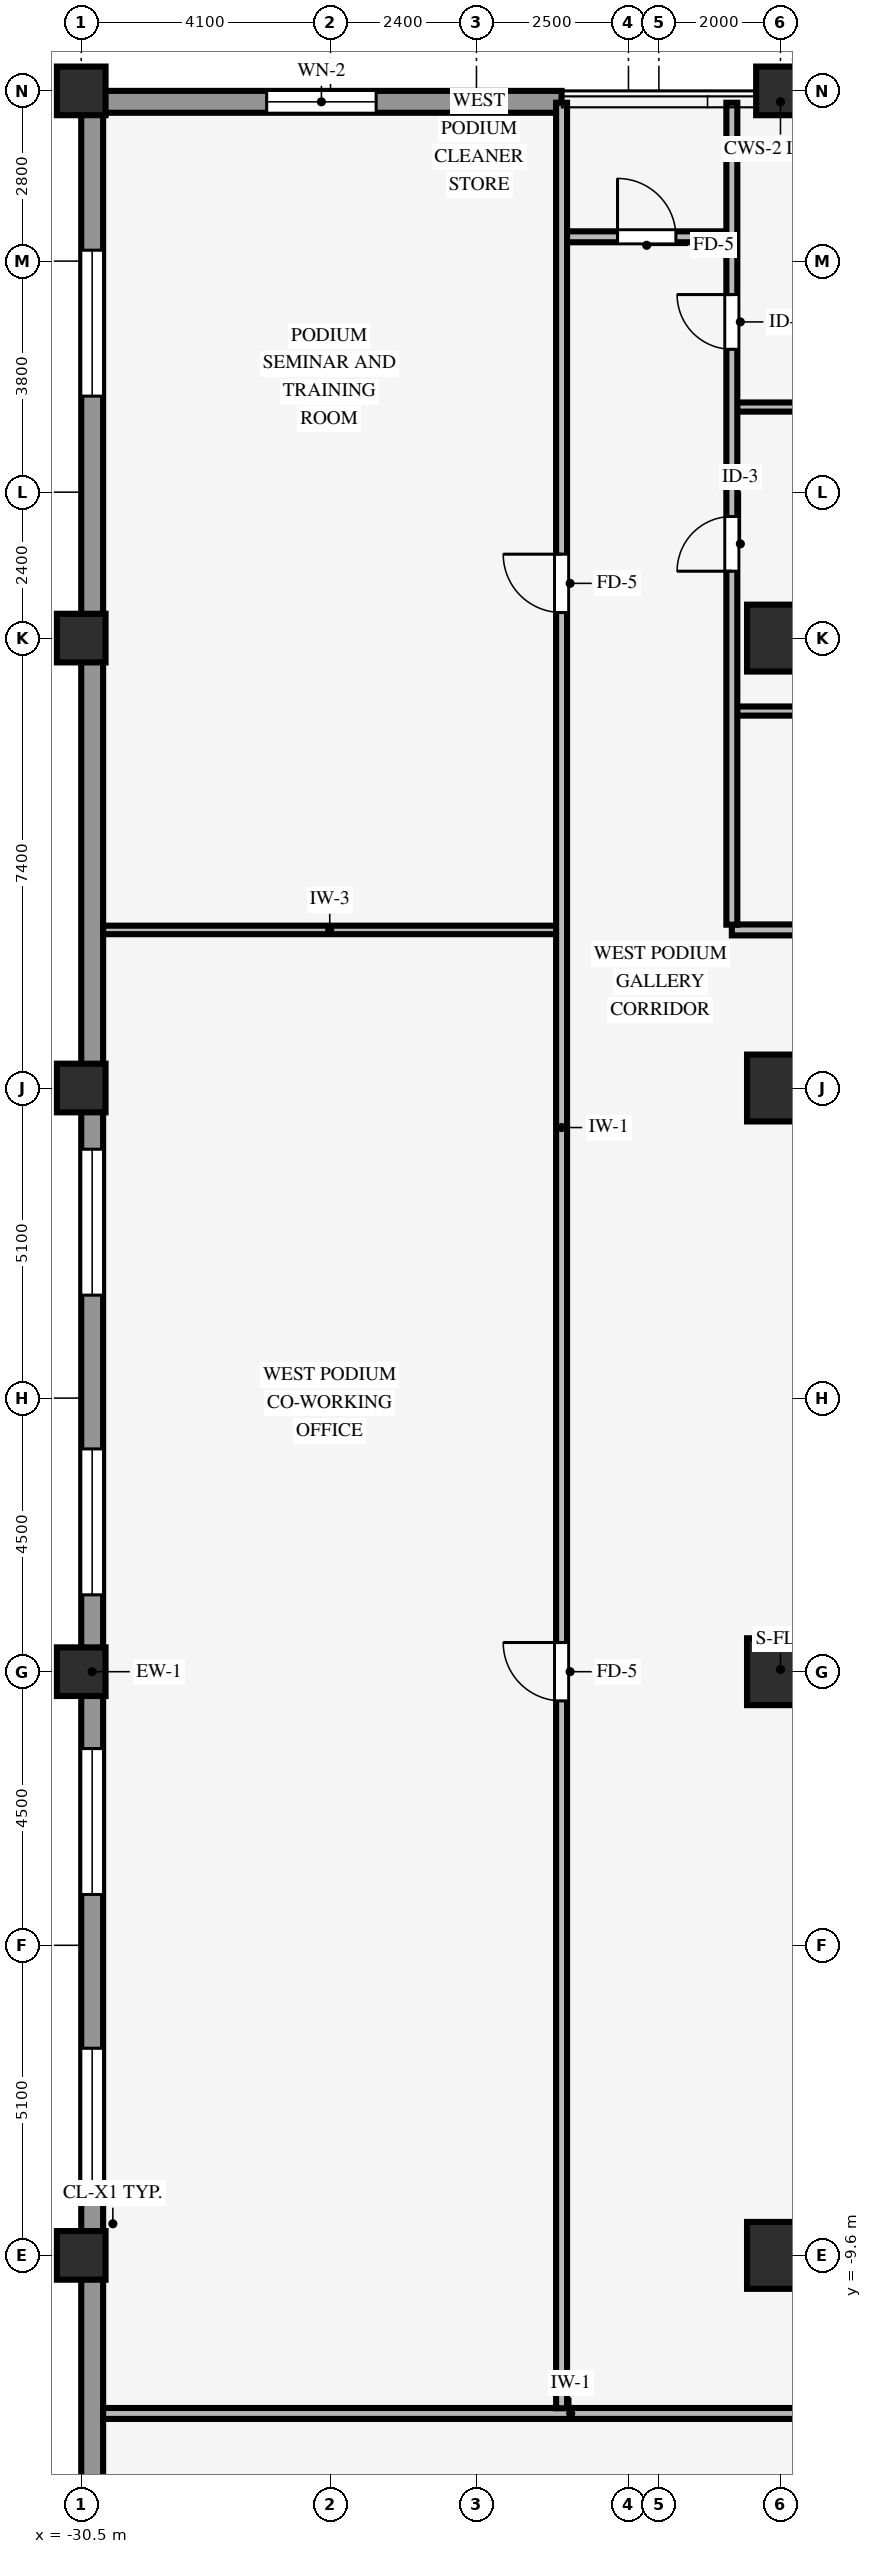
"""IFC4 building model, lengths in metres.
Left out: names, types, materials, properties, quantities, classifications, styles, units other than length and angle.
Written with IfcOpenShell. Run it as: python <this file> out.ifc"""

import sys

from ifc_helpers import new_model, si_unit, direction, frame, frame_2d, origin, origin_2d, place, context, subcontext, project, spatial, rectangle, hollow_rectangle, extrude, source, transform, mapped, element, fill, save


model = new_model("IFC4")
c1 = context("Model", 3, precision=1e-05, world=origin(), true_north=direction((0.0, 1.0)))
c2 = subcontext(c1, "Body", "Model", "MODEL_VIEW")
j1 = project(units=[si_unit("LENGTHUNIT", "METRE"), si_unit("PLANEANGLEUNIT", "RADIAN")], contexts=[c1])
p1 = place(None, origin())
s1 = spatial("IfcSite", under=j1, at=p1, CompositionType="ELEMENT")
p2 = place(p1, origin())
s2 = spatial("IfcBuilding", under=s1, at=p2, CompositionType="ELEMENT")
p3 = place(p2, frame((0.0, 0.0, 4.6)))
s3 = spatial("IfcBuildingStorey", under=s2, at=p3, CompositionType="ELEMENT", Elevation=4.6)
for number, where, z_axis, x_axis in (
    (1, (-30.5, -9.6, 0.0), (0.0, 0.0, 1.0), (1.0, 0.0, 0.0)),
    (2, (-30.5, 0.0, 0.0), (0.0, 0.0, 1.0), (1.0, 0.0, 0.0)),
    (3, (-30.5, 9.6, 0.0), (0.0, 0.0, 1.0), (1.0, 0.0, 0.0)),
    (4, (-30.5, 17.0, 0.0), (0.0, 0.0, 1.0), (1.0, 0.0, 0.0)),
    (5, (-30.5, 26.0, 0.0), (0.0, 0.0, 1.0), (1.0, 0.0, 0.0)),
):
    element("IfcColumn", number, at=place(p3, frame(where, z_axis=z_axis, x_axis=x_axis)), inside=s3, PredefinedType="COLUMN", context=c2, shape_type="SweptSolid", body=[
        extrude(hollow_rectangle(XDim=0.8, YDim=0.8, WallThickness=0.055, InnerFilletRadius=0.055, OuterFilletRadius=0.11, at=origin_2d()), origin(), (0.0, 0.0, 1.0), 4.28),
    ])
for number, where, z_axis, x_axis in (
    (6, (-19.0, -9.6, 0.0), (0.0, 0.0, 1.0), (1.0, 0.0, 0.0)),
    (7, (-19.0, 0.0, 0.0), (0.0, 0.0, 1.0), (1.0, 0.0, 0.0)),
    (8, (-19.0, 9.6, 0.0), (0.0, 0.0, 1.0), (1.0, 0.0, 0.0)),
    (9, (-19.0, 17.0, 0.0), (0.0, 0.0, 1.0), (1.0, 0.0, 0.0)),
):
    element("IfcColumn", number, at=place(p3, frame(where, z_axis=z_axis, x_axis=x_axis)), inside=s3, PredefinedType="COLUMN", context=c2, shape_type="SweptSolid", body=[
        extrude(rectangle(XDim=1.1, YDim=1.1, at=origin_2d()), origin(), (0.0, 0.0, 1.0), 4.28),
    ])
p4 = place(p3, frame((-19.0, 26.0, 0.0), z_axis=(0.0, 0.0, 1.0), x_axis=(1.0, 0.0, 0.0)))
e10 = element("IfcColumn", 10, at=p4, inside=s3, PredefinedType="COLUMN", context=c2, shape_type="SweptSolid", body=[
    extrude(hollow_rectangle(XDim=0.8, YDim=0.8, WallThickness=0.055, InnerFilletRadius=0.055, OuterFilletRadius=0.11, at=origin_2d()), origin(), (0.0, 0.0, 1.0), 4.28),
])
p5 = place(p3, frame((-30.5, 25.82, 0.0), z_axis=(0.0, 0.0, 1.0), x_axis=(1.0, 0.0, 0.0)))
e11 = element("IfcWall", 11, at=p5, inside=s3, PredefinedType="STANDARD", context=c2, shape_type="SweptSolid", body=[
    extrude(rectangle(XDim=7.9, YDim=0.36, at=frame_2d((3.95, 0.0))), origin(), (0.0, 0.0, 1.0), 3.615),
])
p6 = place(p5, frame((3.05, 0.0, 0.85)))
e12 = element("IfcOpeningElement", 12, at=p6, cuts=e11, PredefinedType="OPENING", context=c2, shape_type="SweptSolid", body=[
    extrude(rectangle(XDim=1.8, YDim=2.35, at=frame_2d((0.9, 1.175))), frame((0.0, 0.19, 0.0), z_axis=(0.0, -1.0, 0.0), x_axis=(1.0, 0.0, 0.0)), (0.0, 0.0, 1.0), 0.38),
])
p7 = place(p3, frame((-30.32, -25.644, 0.0), z_axis=(0.0, 0.0, 1.0), x_axis=(0.0, 1.0, 0.0)))
e13 = element("IfcWall", 13, at=p7, inside=s3, PredefinedType="STANDARD", context=c2, shape_type="SweptSolid", body=[
    extrude(rectangle(XDim=51.288, YDim=0.36, at=frame_2d((25.644, 0.0))), origin(), (0.0, 0.0, 1.0), 3.615),
])
p8 = place(p7, frame((2.264, 0.0, 0.85)))
e14 = element("IfcOpeningElement", 14, at=p8, cuts=e13, PredefinedType="OPENING", context=c2, shape_type="SweptSolid", body=[
    extrude(rectangle(XDim=2.4, YDim=2.45, at=frame_2d((1.2, 1.225))), frame((0.0, 0.19, 0.0), z_axis=(0.0, -1.0, 0.0), x_axis=(1.0, 0.0, 0.0)), (0.0, 0.0, 1.0), 0.38),
])
p9 = place(p7, frame((17.051, 0.0, 0.85)))
e15 = element("IfcOpeningElement", 15, at=p9, cuts=e13, PredefinedType="OPENING", context=c2, shape_type="SweptSolid", body=[
    extrude(rectangle(XDim=2.4, YDim=2.45, at=frame_2d((1.2, 1.225))), frame((0.0, 0.19, 0.0), z_axis=(0.0, -1.0, 0.0), x_axis=(1.0, 0.0, 0.0)), (0.0, 0.0, 1.0), 0.38),
])
p10 = place(p7, frame((21.979, 0.0, 0.85)))
e16 = element("IfcOpeningElement", 16, at=p10, cuts=e13, PredefinedType="OPENING", context=c2, shape_type="SweptSolid", body=[
    extrude(rectangle(XDim=2.4, YDim=2.45, at=frame_2d((1.2, 1.225))), frame((0.0, 0.19, 0.0), z_axis=(0.0, -1.0, 0.0), x_axis=(1.0, 0.0, 0.0)), (0.0, 0.0, 1.0), 0.38),
])
p11 = place(p7, frame((26.908, 0.0, 0.85)))
e17 = element("IfcOpeningElement", 17, at=p11, cuts=e13, PredefinedType="OPENING", context=c2, shape_type="SweptSolid", body=[
    extrude(rectangle(XDim=2.4, YDim=2.45, at=frame_2d((1.2, 1.225))), frame((0.0, 0.19, 0.0), z_axis=(0.0, -1.0, 0.0), x_axis=(1.0, 0.0, 0.0)), (0.0, 0.0, 1.0), 0.38),
])
p12 = place(p7, frame((31.837, 0.0, 0.85)))
e18 = element("IfcOpeningElement", 18, at=p12, cuts=e13, PredefinedType="OPENING", context=c2, shape_type="SweptSolid", body=[
    extrude(rectangle(XDim=2.4, YDim=2.45, at=frame_2d((1.2, 1.225))), frame((0.0, 0.19, 0.0), z_axis=(0.0, -1.0, 0.0), x_axis=(1.0, 0.0, 0.0)), (0.0, 0.0, 1.0), 0.38),
])
p13 = place(p7, frame((46.624, 0.0, 0.85)))
e19 = element("IfcOpeningElement", 19, at=p13, cuts=e13, PredefinedType="OPENING", context=c2, shape_type="SweptSolid", body=[
    extrude(rectangle(XDim=2.4, YDim=2.45, at=frame_2d((1.2, 1.225))), frame((0.0, 0.19, 0.0), z_axis=(0.0, -1.0, 0.0), x_axis=(1.0, 0.0, 0.0)), (0.0, 0.0, 1.0), 0.38),
])
p14 = place(p3, frame((-30.14, -12.2, 0.0), z_axis=(0.0, 0.0, 1.0), x_axis=(1.0, 0.0, 0.0)))
e20 = element("IfcWall", 20, at=p14, inside=s3, PredefinedType="PARTITIONING", context=c2, shape_type="SweptSolid", body=[
    extrude(rectangle(XDim=22.28, YDim=0.18, at=frame_2d((11.14, 0.0))), origin(), (0.0, 0.0, 1.0), 4.27),
])
p15 = place(p14, frame((15.83, 0.0, 0.0)))
e21 = element("IfcOpeningElement", 21, at=p15, cuts=e20, PredefinedType="OPENING", context=c2, shape_type="SweptSolid", body=[
    extrude(rectangle(XDim=0.96, YDim=2.1, at=frame_2d((0.48, 1.05))), frame((0.0, 0.1, 0.0), z_axis=(0.0, -1.0, 0.0), x_axis=(1.0, 0.0, 0.0)), (0.0, 0.0, 1.0), 0.2),
])
p16 = place(p3, frame((-30.14, 12.2, 0.0), z_axis=(0.0, 0.0, 1.0), x_axis=(1.0, 0.0, 0.0)))
e22 = element("IfcWall", 22, at=p16, inside=s3, PredefinedType="PARTITIONING", context=c2, shape_type="SweptSolid", body=[
    extrude(rectangle(XDim=7.454, YDim=0.14, at=frame_2d((3.727, 0.0))), origin(), (0.0, 0.0, 1.0), 4.27),
])
p17 = place(p3, frame((-19.8, 12.2, 0.0), z_axis=(0.0, 0.0, 1.0), x_axis=(1.0, 0.0, 0.0)))
e23 = element("IfcWall", 23, at=p17, inside=s3, PredefinedType="PARTITIONING", context=c2, shape_type="SweptSolid", body=[
    extrude(rectangle(XDim=11.94, YDim=0.18, at=frame_2d((5.97, 0.0))), origin(), (0.0, 0.0, 1.0), 4.27),
])
p18 = place(p17, frame((8.29, 0.0, 0.0)))
e24 = element("IfcOpeningElement", 24, at=p18, cuts=e23, PredefinedType="OPENING", context=c2, shape_type="SweptSolid", body=[
    extrude(rectangle(XDim=0.96, YDim=2.1, at=frame_2d((0.48, 1.05))), frame((0.0, 0.1, 0.0), z_axis=(0.0, -1.0, 0.0), x_axis=(1.0, 0.0, 0.0)), (0.0, 0.0, 1.0), 0.2),
])
p19 = place(p17, frame((2.35, 0.0, 0.0)))
e25 = element("IfcOpeningElement", 25, at=p19, cuts=e23, PredefinedType="OPENING", context=c2, shape_type="SweptSolid", body=[
    extrude(rectangle(XDim=0.9, YDim=2.1, at=frame_2d((0.45, 1.05))), frame((0.0, 0.1, 0.0), z_axis=(0.0, -1.0, 0.0), x_axis=(1.0, 0.0, 0.0)), (0.0, 0.0, 1.0), 0.2),
])
for number, where, z_axis, x_axis in (
    (26, (-19.714, 15.8, 0.0), (0.0, 0.0, 1.0), (1.0, 0.0, 0.0)),
    (27, (-19.714, 20.8, 0.0), (0.0, 0.0, 1.0), (1.0, 0.0, 0.0)),
):
    element("IfcWall", number, at=place(p3, frame(where, z_axis=z_axis, x_axis=x_axis)), inside=s3, PredefinedType="PARTITIONING", context=c2, shape_type="SweptSolid", body=[
        extrude(rectangle(XDim=5.443, YDim=0.15, at=frame_2d((2.722, 0.0))), origin(), (0.0, 0.0, 1.0), 4.27),
    ])
p20 = place(p3, frame((-22.514, 23.6, 0.0), z_axis=(0.0, 0.0, 1.0), x_axis=(1.0, 0.0, 0.0)))
e28 = element("IfcWall", 28, at=p20, inside=s3, PredefinedType="PARTITIONING", context=c2, shape_type="SweptSolid", body=[
    extrude(rectangle(XDim=2.628, YDim=0.18, at=frame_2d((1.314, 0.0))), origin(), (0.0, 0.0, 1.0), 4.27),
])
p21 = place(p20, frame((0.834, 0.0, 0.0)))
e29 = element("IfcOpeningElement", 29, at=p21, cuts=e28, PredefinedType="OPENING", context=c2, shape_type="SweptSolid", body=[
    extrude(rectangle(XDim=0.96, YDim=2.1, at=frame_2d((0.48, 1.05))), frame((0.0, 0.1, 0.0), z_axis=(0.0, -1.0, 0.0), x_axis=(1.0, 0.0, 0.0)), (0.0, 0.0, 1.0), 0.2),
])
p22 = place(p3, frame((-22.6, -12.114, 0.0), z_axis=(0.0, 0.0, 1.0), x_axis=(0.0, 1.0, 0.0)))
e30 = element("IfcWall", 30, at=p22, inside=s3, PredefinedType="PARTITIONING", context=c2, shape_type="SweptSolid", body=[
    extrude(rectangle(XDim=37.919, YDim=0.18, at=frame_2d((18.959, 0.0))), origin(), (0.0, 0.0, 1.0), 4.27),
])
p23 = place(p22, frame((11.634, 0.0, 0.0)))
e31 = element("IfcOpeningElement", 31, at=p23, cuts=e30, PredefinedType="OPENING", context=c2, shape_type="SweptSolid", body=[
    extrude(rectangle(XDim=0.96, YDim=2.1, at=frame_2d((0.48, 1.05))), frame((0.0, 0.1, 0.0), z_axis=(0.0, -1.0, 0.0), x_axis=(1.0, 0.0, 0.0)), (0.0, 0.0, 1.0), 0.2),
])
p24 = place(p22, frame((29.534, 0.0, 0.0)))
e32 = element("IfcOpeningElement", 32, at=p24, cuts=e30, PredefinedType="OPENING", context=c2, shape_type="SweptSolid", body=[
    extrude(rectangle(XDim=0.96, YDim=2.1, at=frame_2d((0.48, 1.05))), frame((0.0, 0.1, 0.0), z_axis=(0.0, -1.0, 0.0), x_axis=(1.0, 0.0, 0.0)), (0.0, 0.0, 1.0), 0.2),
])
p25 = place(p3, frame((-19.8, 12.286, 0.0), z_axis=(0.0, 0.0, 1.0), x_axis=(0.0, 1.0, 0.0)))
e33 = element("IfcWall", 33, at=p25, inside=s3, PredefinedType="PARTITIONING", context=c2, shape_type="SweptSolid", body=[
    extrude(rectangle(XDim=13.519, YDim=0.18, at=frame_2d((6.76, 0.0))), origin(), (0.0, 0.0, 1.0), 4.27),
])
p26 = place(p25, frame((5.814, 0.0, 0.0)))
e34 = element("IfcOpeningElement", 34, at=p26, cuts=e33, PredefinedType="OPENING", context=c2, shape_type="SweptSolid", body=[
    extrude(rectangle(XDim=0.9, YDim=2.1, at=frame_2d((0.45, 1.05))), frame((0.0, 0.1, 0.0), z_axis=(0.0, -1.0, 0.0), x_axis=(1.0, 0.0, 0.0)), (0.0, 0.0, 1.0), 0.2),
])
p27 = place(p25, frame((9.464, 0.0, 0.0)))
e35 = element("IfcOpeningElement", 35, at=p27, cuts=e33, PredefinedType="OPENING", context=c2, shape_type="SweptSolid", body=[
    extrude(rectangle(XDim=0.9, YDim=2.1, at=frame_2d((0.45, 1.05))), frame((0.0, 0.1, 0.0), z_axis=(0.0, -1.0, 0.0), x_axis=(1.0, 0.0, 0.0)), (0.0, 0.0, 1.0), 0.2),
])
m1 = source(origin(), c2, "Body", "SweptSolid", [
    extrude(rectangle(XDim=1.8, YDim=2.35, at=frame_2d((0.9, 1.175))), frame((0.0, 0.03, 0.0), z_axis=(0.0, -1.0, 0.0), x_axis=(1.0, 0.0, 0.0)), (0.0, 0.0, 1.0), 0.06),
])
p28 = place(p6, origin())
e36 = element("IfcWindow", 36, at=p28, inside=s3, PartitioningType="SINGLE_PANEL", PredefinedType="WINDOW", context=c2, shape_type="MappedRepresentation", body=[
    mapped(m1, transform((0.0, 0.0, 0.0), scale=1.0)),
])
fill(e12, e36)
m2 = source(origin(), c2, "Body", "SweptSolid", [
    extrude(rectangle(XDim=2.4, YDim=2.45, at=frame_2d((1.2, 1.225))), frame((0.0, 0.03, 0.0), z_axis=(0.0, -1.0, 0.0), x_axis=(1.0, 0.0, 0.0)), (0.0, 0.0, 1.0), 0.06),
])
p29 = place(p9, origin())
e37 = element("IfcWindow", 37, at=p29, inside=s3, PartitioningType="SINGLE_PANEL", PredefinedType="WINDOW", context=c2, shape_type="MappedRepresentation", body=[
    mapped(m2, transform((0.0, 0.0, 0.0), scale=1.0)),
])
fill(e15, e37)
p30 = place(p10, origin())
e38 = element("IfcWindow", 38, at=p30, inside=s3, PartitioningType="SINGLE_PANEL", PredefinedType="WINDOW", context=c2, shape_type="MappedRepresentation", body=[
    mapped(m2, transform((0.0, 0.0, 0.0), scale=1.0)),
])
fill(e16, e38)
p31 = place(p11, origin())
e39 = element("IfcWindow", 39, at=p31, inside=s3, PartitioningType="SINGLE_PANEL", PredefinedType="WINDOW", context=c2, shape_type="MappedRepresentation", body=[
    mapped(m2, transform((0.0, 0.0, 0.0), scale=1.0)),
])
fill(e17, e39)
p32 = place(p12, origin())
e40 = element("IfcWindow", 40, at=p32, inside=s3, PartitioningType="SINGLE_PANEL", PredefinedType="WINDOW", context=c2, shape_type="MappedRepresentation", body=[
    mapped(m2, transform((0.0, 0.0, 0.0), scale=1.0)),
])
fill(e18, e40)
p33 = place(p13, origin())
e41 = element("IfcWindow", 41, at=p33, inside=s3, PartitioningType="SINGLE_PANEL", PredefinedType="WINDOW", context=c2, shape_type="MappedRepresentation", body=[
    mapped(m2, transform((0.0, 0.0, 0.0), scale=1.0)),
])
fill(e19, e41)
m3 = source(origin(), c2, "Body", "SweptSolid", [
    extrude(rectangle(XDim=0.96, YDim=2.1, at=frame_2d((0.48, 1.05))), frame((0.0, 0.025, 0.0), z_axis=(0.0, -1.0, 0.0), x_axis=(1.0, 0.0, 0.0)), (0.0, 0.0, 1.0), 0.05),
])
p34 = place(p23, origin())
e42 = element("IfcDoor", 42, at=p34, inside=s3, OperationType="SINGLE_SWING_RIGHT", PredefinedType="DOOR", context=c2, shape_type="MappedRepresentation", body=[
    mapped(m3, transform((0.0, 0.0, 0.0), scale=1.0)),
])
fill(e31, e42)
p35 = place(p24, origin())
e43 = element("IfcDoor", 43, at=p35, inside=s3, OperationType="SINGLE_SWING_RIGHT", PredefinedType="DOOR", context=c2, shape_type="MappedRepresentation", body=[
    mapped(m3, transform((0.0, 0.0, 0.0), scale=1.0)),
])
fill(e32, e43)
m4 = source(origin(), c2, "Body", "SweptSolid", [
    extrude(rectangle(XDim=0.9, YDim=2.1, at=frame_2d((0.45, 1.05))), frame((0.0, 0.025, 0.0), z_axis=(0.0, -1.0, 0.0), x_axis=(1.0, 0.0, 0.0)), (0.0, 0.0, 1.0), 0.05),
])
p36 = place(p26, origin())
e44 = element("IfcDoor", 44, at=p36, inside=s3, OperationType="SINGLE_SWING_LEFT", PredefinedType="DOOR", context=c2, shape_type="MappedRepresentation", body=[
    mapped(m4, transform((0.0, 0.0, 0.0), scale=1.0)),
])
fill(e34, e44)
p37 = place(p27, origin())
e45 = element("IfcDoor", 45, at=p37, inside=s3, OperationType="SINGLE_SWING_RIGHT", PredefinedType="DOOR", context=c2, shape_type="MappedRepresentation", body=[
    mapped(m4, transform((0.0, 0.0, 0.0), scale=1.0)),
])
fill(e35, e45)
p38 = place(p21, origin())
e46 = element("IfcDoor", 46, at=p38, inside=s3, OperationType="SINGLE_SWING_LEFT", PredefinedType="DOOR", context=c2, shape_type="MappedRepresentation", body=[
    mapped(m3, transform((0.0, 0.0, 0.0), scale=1.0)),
])
fill(e29, e46)
save(model, sys.argv[1])
